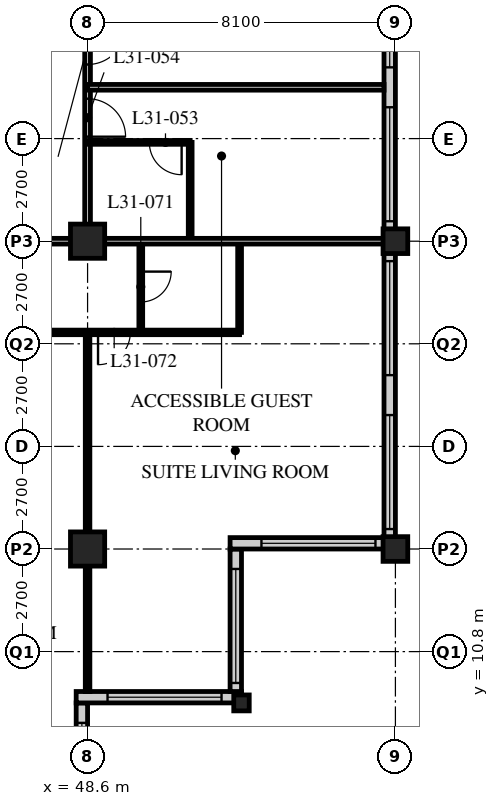
"""IFC4 building model, lengths in metres.
Left out: names, types, materials, properties, quantities, classifications, styles, units other than length and angle.
Written with IfcOpenShell. Run it as: python <this file> out.ifc"""

import sys

from ifc_helpers import new_model, si_unit, direction, frame, frame_2d, origin, origin_2d, place, context, subcontext, project, spatial, rectangle, hollow_rectangle, i_section, extrude, element, fill, save


model = new_model("IFC4")
c1 = context("Model", 3, precision=1e-05, world=origin(), true_north=direction((0.0, 1.0)))
c2 = subcontext(c1, "Body", "Model", "MODEL_VIEW")
j1 = project(units=[si_unit("LENGTHUNIT", "METRE"), si_unit("PLANEANGLEUNIT", "RADIAN")], contexts=[c1])
p1 = place(None, origin())
s1 = spatial("IfcSite", under=j1, at=p1, CompositionType="ELEMENT")
p2 = place(p1, origin())
s2 = spatial("IfcBuilding", under=s1, at=p2, CompositionType="ELEMENT")
p3 = place(p2, frame((0.0, 0.0, 123.8)))
s3 = spatial("IfcBuildingStorey", under=s2, at=p3, CompositionType="ELEMENT", Elevation=123.8)
for number, where, z_axis, x_axis in (
    (1, (48.6, 13.5, 0.0), (0.0, 0.0, 1.0), (1.0, 0.0, 0.0)),
    (2, (48.6, 21.6, 0.0), (0.0, 0.0, 1.0), (1.0, 0.0, 0.0)),
):
    element("IfcColumn", number, at=place(p3, frame(where, z_axis=z_axis, x_axis=x_axis)), inside=s3, PredefinedType="COLUMN", context=c2, shape_type="SweptSolid", body=[
        extrude(hollow_rectangle(XDim=0.9, YDim=0.9, WallThickness=0.09, at=origin_2d()), origin(), (0.0, 0.0, 1.0), 3.4),
    ])
p4 = place(p3, frame((52.65, 9.45, 0.0), z_axis=(0.0, 0.0, 1.0), x_axis=(1.0, 0.0, 0.0)))
e3 = element("IfcColumn", 3, at=p4, inside=s3, PredefinedType="COLUMN", context=c2, shape_type="SweptSolid", body=[
    extrude(i_section(OverallWidth=0.407, OverallDepth=0.419, WebThickness=0.031, FlangeThickness=0.049, FilletRadius=0.015, at=origin_2d()), origin(), (0.0, 0.0, 1.0), 3.4),
])
for number, where, z_axis, x_axis in (
    (4, (56.7, 13.5, 0.0), (0.0, 0.0, 1.0), (1.0, 0.0, 0.0)),
    (5, (56.7, 21.6, 0.0), (0.0, 0.0, 1.0), (1.0, 0.0, 0.0)),
):
    element("IfcColumn", number, at=place(p3, frame(where, z_axis=z_axis, x_axis=x_axis)), inside=s3, PredefinedType="COLUMN", context=c2, shape_type="SweptSolid", body=[
        extrude(hollow_rectangle(XDim=0.65, YDim=0.65, WallThickness=0.055, at=origin_2d()), origin(), (0.0, 0.0, 1.0), 3.4),
    ])
p5 = place(p3, frame((48.45, 5.7, 0.0), z_axis=(0.0, 0.0, 1.0), x_axis=(0.0, 1.0, 0.0)))
e6 = element("IfcWall", 6, at=p5, inside=s3, PredefinedType="SOLIDWALL", context=c2, shape_type="SweptSolid", body=[
    extrude(rectangle(XDim=3.75, YDim=0.3, at=frame_2d((1.875, 0.0))), origin(), (0.0, 0.0, 1.0), 3.19),
])
p6 = place(p5, frame((0.225, 0.0, 0.9)))
e7 = element("IfcOpeningElement", 7, at=p6, cuts=e6, PredefinedType="OPENING", context=c2, shape_type="SweptSolid", body=[
    extrude(rectangle(XDim=3.0, YDim=1.5, at=frame_2d((1.5, 0.75))), frame((0.0, 0.16, 0.0), z_axis=(0.0, -1.0, 0.0), x_axis=(1.0, 0.0, 0.0)), (0.0, 0.0, 1.0), 0.32),
])
p7 = place(p3, frame((48.3, 9.6, 0.0), z_axis=(0.0, 0.0, 1.0), x_axis=(1.0, 0.0, 0.0)))
e8 = element("IfcWall", 8, at=p7, inside=s3, PredefinedType="SOLIDWALL", context=c2, shape_type="SweptSolid", body=[
    extrude(rectangle(XDim=4.35, YDim=0.3, at=frame_2d((2.175, 0.0))), origin(), (0.0, 0.0, 1.0), 3.19),
])
p8 = place(p7, frame((0.825, 0.0, 0.9)))
e9 = element("IfcOpeningElement", 9, at=p8, cuts=e8, PredefinedType="OPENING", context=c2, shape_type="SweptSolid", body=[
    extrude(rectangle(XDim=3.0, YDim=1.5, at=frame_2d((1.5, 0.75))), frame((0.0, 0.16, 0.0), z_axis=(0.0, -1.0, 0.0), x_axis=(1.0, 0.0, 0.0)), (0.0, 0.0, 1.0), 0.32),
])
p9 = place(p3, frame((52.5, 9.75, 0.0), z_axis=(0.0, 0.0, 1.0), x_axis=(0.0, 1.0, 0.0)))
e10 = element("IfcWall", 10, at=p9, inside=s3, PredefinedType="SOLIDWALL", context=c2, shape_type="SweptSolid", body=[
    extrude(rectangle(XDim=3.75, YDim=0.3, at=frame_2d((1.875, 0.0))), origin(), (0.0, 0.0, 1.0), 3.19),
])
p10 = place(p9, frame((0.225, 0.0, 0.9)))
e11 = element("IfcOpeningElement", 11, at=p10, cuts=e10, PredefinedType="OPENING", context=c2, shape_type="SweptSolid", body=[
    extrude(rectangle(XDim=3.0, YDim=1.5, at=frame_2d((1.5, 0.75))), frame((0.0, 0.16, 0.0), z_axis=(0.0, -1.0, 0.0), x_axis=(1.0, 0.0, 0.0)), (0.0, 0.0, 1.0), 0.32),
])
p11 = place(p3, frame((52.35, 13.65, 0.0), z_axis=(0.0, 0.0, 1.0), x_axis=(1.0, 0.0, 0.0)))
e12 = element("IfcWall", 12, at=p11, inside=s3, PredefinedType="SOLIDWALL", context=c2, shape_type="SweptSolid", body=[
    extrude(rectangle(XDim=4.35, YDim=0.3, at=frame_2d((2.175, 0.0))), origin(), (0.0, 0.0, 1.0), 3.19),
])
p12 = place(p11, frame((0.825, 0.0, 0.9)))
e13 = element("IfcOpeningElement", 13, at=p12, cuts=e12, PredefinedType="OPENING", context=c2, shape_type="SweptSolid", body=[
    extrude(rectangle(XDim=3.0, YDim=1.5, at=frame_2d((1.5, 0.75))), frame((0.0, 0.16, 0.0), z_axis=(0.0, -1.0, 0.0), x_axis=(1.0, 0.0, 0.0)), (0.0, 0.0, 1.0), 0.32),
])
p13 = place(p3, frame((56.55, 13.8, 0.0), z_axis=(0.0, 0.0, 1.0), x_axis=(0.0, 1.0, 0.0)))
e14 = element("IfcWall", 14, at=p13, inside=s3, PredefinedType="SOLIDWALL", context=c2, shape_type="SweptSolid", body=[
    extrude(rectangle(XDim=32.1, YDim=0.3, at=frame_2d((16.05, 0.0))), origin(), (0.0, 0.0, 1.0), 3.19),
])
p14 = place(p13, frame((0.225, 0.0, 0.9)))
e15 = element("IfcOpeningElement", 15, at=p14, cuts=e14, PredefinedType="OPENING", context=c2, shape_type="SweptSolid", body=[
    extrude(rectangle(XDim=3.0, YDim=2.0, at=frame_2d((1.5, 1.0))), frame((0.0, 0.16, 0.0), z_axis=(0.0, -1.0, 0.0), x_axis=(1.0, 0.0, 0.0)), (0.0, 0.0, 1.0), 0.32),
])
p15 = place(p13, frame((4.275, 0.0, 0.9)))
e16 = element("IfcOpeningElement", 16, at=p15, cuts=e14, PredefinedType="OPENING", context=c2, shape_type="SweptSolid", body=[
    extrude(rectangle(XDim=3.0, YDim=2.0, at=frame_2d((1.5, 1.0))), frame((0.0, 0.16, 0.0), z_axis=(0.0, -1.0, 0.0), x_axis=(1.0, 0.0, 0.0)), (0.0, 0.0, 1.0), 0.32),
])
p16 = place(p13, frame((8.325, 0.0, 0.9)))
e17 = element("IfcOpeningElement", 17, at=p16, cuts=e14, PredefinedType="OPENING", context=c2, shape_type="SweptSolid", body=[
    extrude(rectangle(XDim=3.0, YDim=2.0, at=frame_2d((1.5, 1.0))), frame((0.0, 0.16, 0.0), z_axis=(0.0, -1.0, 0.0), x_axis=(1.0, 0.0, 0.0)), (0.0, 0.0, 1.0), 0.32),
])
p17 = place(p13, frame((12.375, 0.0, 0.9)))
e18 = element("IfcOpeningElement", 18, at=p17, cuts=e14, PredefinedType="OPENING", context=c2, shape_type="SweptSolid", body=[
    extrude(rectangle(XDim=3.0, YDim=2.0, at=frame_2d((1.5, 1.0))), frame((0.0, 0.16, 0.0), z_axis=(0.0, -1.0, 0.0), x_axis=(1.0, 0.0, 0.0)), (0.0, 0.0, 1.0), 0.32),
])
p18 = place(p13, frame((16.425, 0.0, 0.9)))
e19 = element("IfcOpeningElement", 19, at=p18, cuts=e14, PredefinedType="OPENING", context=c2, shape_type="SweptSolid", body=[
    extrude(rectangle(XDim=3.0, YDim=2.0, at=frame_2d((1.5, 1.0))), frame((0.0, 0.16, 0.0), z_axis=(0.0, -1.0, 0.0), x_axis=(1.0, 0.0, 0.0)), (0.0, 0.0, 1.0), 0.32),
])
p19 = place(p13, frame((20.475, 0.0, 0.9)))
e20 = element("IfcOpeningElement", 20, at=p19, cuts=e14, PredefinedType="OPENING", context=c2, shape_type="SweptSolid", body=[
    extrude(rectangle(XDim=3.0, YDim=2.0, at=frame_2d((1.5, 1.0))), frame((0.0, 0.16, 0.0), z_axis=(0.0, -1.0, 0.0), x_axis=(1.0, 0.0, 0.0)), (0.0, 0.0, 1.0), 0.32),
])
p20 = place(p13, frame((24.525, 0.0, 0.9)))
e21 = element("IfcOpeningElement", 21, at=p20, cuts=e14, PredefinedType="OPENING", context=c2, shape_type="SweptSolid", body=[
    extrude(rectangle(XDim=3.0, YDim=2.0, at=frame_2d((1.5, 1.0))), frame((0.0, 0.16, 0.0), z_axis=(0.0, -1.0, 0.0), x_axis=(1.0, 0.0, 0.0)), (0.0, 0.0, 1.0), 0.32),
])
p21 = place(p13, frame((28.575, 0.0, 0.9)))
e22 = element("IfcOpeningElement", 22, at=p21, cuts=e14, PredefinedType="OPENING", context=c2, shape_type="SweptSolid", body=[
    extrude(rectangle(XDim=3.0, YDim=2.0, at=frame_2d((1.5, 1.0))), frame((0.0, 0.16, 0.0), z_axis=(0.0, -1.0, 0.0), x_axis=(1.0, 0.0, 0.0)), (0.0, 0.0, 1.0), 0.32),
])
p22 = place(p3, frame((8.1, 21.6, 0.0), z_axis=(0.0, 0.0, 1.0), x_axis=(1.0, 0.0, 0.0)))
e23 = element("IfcWall", 23, at=p22, inside=s3, PredefinedType="PARTITIONING", context=c2, shape_type="SweptSolid", body=[
    extrude(rectangle(XDim=40.5, YDim=0.15, at=frame_2d((20.25, 0.0))), origin(), (0.0, 0.0, 1.0), 2.578),
])
p23 = place(p22, frame((9.625, 0.0, 0.0)))
e24 = element("IfcOpeningElement", 24, at=p23, cuts=e23, PredefinedType="OPENING", context=c2, shape_type="SweptSolid", body=[
    extrude(rectangle(XDim=1.0, YDim=2.1, at=frame_2d((0.5, 1.05))), frame((0.0, 0.085, 0.0), z_axis=(0.0, -1.0, 0.0), x_axis=(1.0, 0.0, 0.0)), (0.0, 0.0, 1.0), 0.17),
])
p24 = place(p22, frame((21.775, 0.0, 0.0)))
e25 = element("IfcOpeningElement", 25, at=p24, cuts=e23, PredefinedType="OPENING", context=c2, shape_type="SweptSolid", body=[
    extrude(rectangle(XDim=1.0, YDim=2.1, at=frame_2d((0.5, 1.05))), frame((0.0, 0.085, 0.0), z_axis=(0.0, -1.0, 0.0), x_axis=(1.0, 0.0, 0.0)), (0.0, 0.0, 1.0), 0.17),
])
p25 = place(p22, frame((28.95, 0.0, 0.0)))
e26 = element("IfcOpeningElement", 26, at=p25, cuts=e23, PredefinedType="OPENING", context=c2, shape_type="SweptSolid", body=[
    extrude(rectangle(XDim=1.0, YDim=2.1, at=frame_2d((0.5, 1.05))), frame((0.0, 0.085, 0.0), z_axis=(0.0, -1.0, 0.0), x_axis=(1.0, 0.0, 0.0)), (0.0, 0.0, 1.0), 0.17),
])
p26 = place(p22, frame((34.85, 0.0, 0.0)))
e27 = element("IfcOpeningElement", 27, at=p26, cuts=e23, PredefinedType="OPENING", context=c2, shape_type="SweptSolid", body=[
    extrude(rectangle(XDim=1.0, YDim=2.1, at=frame_2d((0.5, 1.05))), frame((0.0, 0.085, 0.0), z_axis=(0.0, -1.0, 0.0), x_axis=(1.0, 0.0, 0.0)), (0.0, 0.0, 1.0), 0.17),
])
p27 = place(p22, frame((1.525, 0.0, 0.0)))
e28 = element("IfcOpeningElement", 28, at=p27, cuts=e23, PredefinedType="OPENING", context=c2, shape_type="SweptSolid", body=[
    extrude(rectangle(XDim=1.0, YDim=2.1, at=frame_2d((0.5, 1.05))), frame((0.0, 0.085, 0.0), z_axis=(0.0, -1.0, 0.0), x_axis=(1.0, 0.0, 0.0)), (0.0, 0.0, 1.0), 0.17),
])
p28 = place(p22, frame((37.975, 0.0, 0.0)))
e29 = element("IfcOpeningElement", 29, at=p28, cuts=e23, PredefinedType="OPENING", context=c2, shape_type="SweptSolid", body=[
    extrude(rectangle(XDim=1.0, YDim=2.1, at=frame_2d((0.5, 1.05))), frame((0.0, 0.085, 0.0), z_axis=(0.0, -1.0, 0.0), x_axis=(1.0, 0.0, 0.0)), (0.0, 0.0, 1.0), 0.17),
])
p29 = place(p3, frame((48.6, 21.6, 0.0), z_axis=(0.0, 0.0, 1.0), x_axis=(0.0, 1.0, 0.0)))
e30 = element("IfcWall", 30, at=p29, inside=s3, PredefinedType="PARTITIONING", context=c2, shape_type="SweptSolid", body=[
    extrude(rectangle(XDim=24.3, YDim=0.15, at=frame_2d((12.15, 0.0))), origin(), (0.0, 0.0, 1.0), 2.578),
])
p30 = place(p29, frame((2.75, 0.0, 0.0)))
e31 = element("IfcOpeningElement", 31, at=p30, cuts=e30, PredefinedType="OPENING", context=c2, shape_type="SweptSolid", body=[
    extrude(rectangle(XDim=1.0, YDim=2.1, at=frame_2d((0.5, 1.05))), frame((0.0, 0.085, 0.0), z_axis=(0.0, -1.0, 0.0), x_axis=(1.0, 0.0, 0.0)), (0.0, 0.0, 1.0), 0.17),
])
p31 = place(p29, frame((4.65, 0.0, 0.0)))
e32 = element("IfcOpeningElement", 32, at=p31, cuts=e30, PredefinedType="OPENING", context=c2, shape_type="SweptSolid", body=[
    extrude(rectangle(XDim=1.0, YDim=2.1, at=frame_2d((0.5, 1.05))), frame((0.0, 0.085, 0.0), z_axis=(0.0, -1.0, 0.0), x_axis=(1.0, 0.0, 0.0)), (0.0, 0.0, 1.0), 0.17),
])
p32 = place(p29, frame((10.0, 0.0, 0.0)))
e33 = element("IfcOpeningElement", 33, at=p32, cuts=e30, PredefinedType="OPENING", context=c2, shape_type="SweptSolid", body=[
    extrude(rectangle(XDim=1.0, YDim=2.1, at=frame_2d((0.5, 1.05))), frame((0.0, 0.085, 0.0), z_axis=(0.0, -1.0, 0.0), x_axis=(1.0, 0.0, 0.0)), (0.0, 0.0, 1.0), 0.17),
])
p33 = place(p29, frame((18.1, 0.0, 0.0)))
e34 = element("IfcOpeningElement", 34, at=p33, cuts=e30, PredefinedType="OPENING", context=c2, shape_type="SweptSolid", body=[
    extrude(rectangle(XDim=1.0, YDim=2.1, at=frame_2d((0.5, 1.05))), frame((0.0, 0.085, 0.0), z_axis=(0.0, -1.0, 0.0), x_axis=(1.0, 0.0, 0.0)), (0.0, 0.0, 1.0), 0.17),
])
p34 = place(p3, frame((51.3, 21.6, 0.0), z_axis=(0.0, 0.0, 1.0), x_axis=(0.0, 1.0, 0.0)))
e35 = element("IfcWall", 35, at=p34, inside=s3, PredefinedType="PARTITIONING", context=c2, shape_type="SweptSolid", body=[
    extrude(rectangle(XDim=2.6, YDim=0.1, at=frame_2d((1.3, 0.0))), origin(), (0.0, 0.0, 1.0), 3.19),
])
p35 = place(p3, frame((48.6, 24.2, 0.0), z_axis=(0.0, 0.0, 1.0), x_axis=(1.0, 0.0, 0.0)))
e36 = element("IfcWall", 36, at=p35, inside=s3, PredefinedType="PARTITIONING", context=c2, shape_type="SweptSolid", body=[
    extrude(rectangle(XDim=2.7, YDim=0.1, at=frame_2d((1.35, 0.0))), origin(), (0.0, 0.0, 1.0), 3.19),
])
p36 = place(p35, frame((1.625, 0.0, 0.0)))
e37 = element("IfcOpeningElement", 37, at=p36, cuts=e36, PredefinedType="OPENING", context=c2, shape_type="SweptSolid", body=[
    extrude(rectangle(XDim=0.85, YDim=2.1, at=frame_2d((0.425, 1.05))), frame((0.0, 0.06, 0.0), z_axis=(0.0, -1.0, 0.0), x_axis=(1.0, 0.0, 0.0)), (0.0, 0.0, 1.0), 0.12),
])
p37 = place(p3, frame((48.6, 25.65, 0.0), z_axis=(0.0, 0.0, 1.0), x_axis=(1.0, 0.0, 0.0)))
e38 = element("IfcWall", 38, at=p37, inside=s3, PredefinedType="PARTITIONING", context=c2, shape_type="SweptSolid", body=[
    extrude(rectangle(XDim=7.8, YDim=0.15, at=frame_2d((3.9, 0.0))), origin(), (0.0, 0.0, 1.0), 3.19),
])
p38 = place(p3, frame((44.55, 19.2, 0.0), z_axis=(0.0, 0.0, 1.0), x_axis=(1.0, 0.0, 0.0)))
e39 = element("IfcWall", 39, at=p38, inside=s3, PredefinedType="PARTITIONING", context=c2, shape_type="SweptSolid", body=[
    extrude(rectangle(XDim=8.05, YDim=0.12, at=frame_2d((4.025, 0.0))), origin(), (0.0, 0.0, 1.0), 3.19),
])
p39 = place(p38, frame((0.475, 0.0, 0.0)))
e40 = element("IfcOpeningElement", 40, at=p39, cuts=e39, PredefinedType="OPENING", context=c2, shape_type="SweptSolid", body=[
    extrude(rectangle(XDim=0.85, YDim=2.1, at=frame_2d((0.425, 1.05))), frame((0.0, 0.07, 0.0), z_axis=(0.0, -1.0, 0.0), x_axis=(1.0, 0.0, 0.0)), (0.0, 0.0, 1.0), 0.14),
])
p40 = place(p38, frame((4.325, 0.0, 0.0)))
e41 = element("IfcOpeningElement", 41, at=p40, cuts=e39, PredefinedType="OPENING", context=c2, shape_type="SweptSolid", body=[
    extrude(rectangle(XDim=0.85, YDim=2.1, at=frame_2d((0.425, 1.05))), frame((0.0, 0.07, 0.0), z_axis=(0.0, -1.0, 0.0), x_axis=(1.0, 0.0, 0.0)), (0.0, 0.0, 1.0), 0.14),
])
p41 = place(p3, frame((50.0, 21.6, 0.0), z_axis=(0.0, 0.0, 1.0), x_axis=(0.0, -1.0, 0.0)))
e42 = element("IfcWall", 42, at=p41, inside=s3, PredefinedType="PARTITIONING", context=c2, shape_type="SweptSolid", body=[
    extrude(rectangle(XDim=2.4, YDim=0.1, at=frame_2d((1.2, 0.0))), origin(), (0.0, 0.0, 1.0), 3.19),
])
p42 = place(p41, frame((0.8, 0.0, 0.0)))
e43 = element("IfcOpeningElement", 43, at=p42, cuts=e42, PredefinedType="OPENING", context=c2, shape_type="SweptSolid", body=[
    extrude(rectangle(XDim=0.8, YDim=2.1, at=frame_2d((0.4, 1.05))), frame((0.0, 0.06, 0.0), z_axis=(0.0, -1.0, 0.0), x_axis=(1.0, 0.0, 0.0)), (0.0, 0.0, 1.0), 0.12),
])
p43 = place(p3, frame((52.6, 21.6, 0.0), z_axis=(0.0, 0.0, 1.0), x_axis=(0.0, -1.0, 0.0)))
e44 = element("IfcWall", 44, at=p43, inside=s3, PredefinedType="PARTITIONING", context=c2, shape_type="SweptSolid", body=[
    extrude(rectangle(XDim=2.4, YDim=0.1, at=frame_2d((1.2, 0.0))), origin(), (0.0, 0.0, 1.0), 3.19),
])
p44 = place(p3, frame((48.6, 19.2, 0.0), z_axis=(0.0, 0.0, 1.0), x_axis=(0.0, -1.0, 0.0)))
e45 = element("IfcWall", 45, at=p44, inside=s3, PredefinedType="PARTITIONING", context=c2, shape_type="SweptSolid", body=[
    extrude(rectangle(XDim=9.45, YDim=0.12, at=frame_2d((4.725, 0.0))), origin(), (0.0, 0.0, 1.0), 2.578),
])
p45 = place(p3, frame((48.6, 21.6, 0.0), z_axis=(0.0, 0.0, 1.0), x_axis=(1.0, 0.0, 0.0)))
e46 = element("IfcWall", 46, at=p45, inside=s3, PredefinedType="PARTITIONING", context=c2, shape_type="SweptSolid", body=[
    extrude(rectangle(XDim=7.8, YDim=0.15, at=frame_2d((3.9, 0.0))), origin(), (0.0, 0.0, 1.0), 2.578),
])
p46 = place(p6, origin())
e47 = element("IfcWindow", 47, at=p46, inside=s3, PartitioningType="SINGLE_PANEL", PredefinedType="WINDOW", context=c2, shape_type="SweptSolid", body=[
    extrude(rectangle(XDim=3.0, YDim=1.5, at=frame_2d((1.5, 0.75))), frame((0.0, 0.03, 0.0), z_axis=(0.0, -1.0, 0.0), x_axis=(1.0, 0.0, 0.0)), (0.0, 0.0, 1.0), 0.06),
])
fill(e7, e47)
p47 = place(p8, origin())
e48 = element("IfcWindow", 48, at=p47, inside=s3, PartitioningType="SINGLE_PANEL", PredefinedType="WINDOW", context=c2, shape_type="SweptSolid", body=[
    extrude(rectangle(XDim=3.0, YDim=1.5, at=frame_2d((1.5, 0.75))), frame((0.0, 0.03, 0.0), z_axis=(0.0, -1.0, 0.0), x_axis=(1.0, 0.0, 0.0)), (0.0, 0.0, 1.0), 0.06),
])
fill(e9, e48)
p48 = place(p10, origin())
e49 = element("IfcWindow", 49, at=p48, inside=s3, PartitioningType="SINGLE_PANEL", PredefinedType="WINDOW", context=c2, shape_type="SweptSolid", body=[
    extrude(rectangle(XDim=3.0, YDim=1.5, at=frame_2d((1.5, 0.75))), frame((0.0, 0.03, 0.0), z_axis=(0.0, -1.0, 0.0), x_axis=(1.0, 0.0, 0.0)), (0.0, 0.0, 1.0), 0.06),
])
fill(e11, e49)
p49 = place(p12, origin())
e50 = element("IfcWindow", 50, at=p49, inside=s3, PartitioningType="SINGLE_PANEL", PredefinedType="WINDOW", context=c2, shape_type="SweptSolid", body=[
    extrude(rectangle(XDim=3.0, YDim=1.5, at=frame_2d((1.5, 0.75))), frame((0.0, 0.03, 0.0), z_axis=(0.0, -1.0, 0.0), x_axis=(1.0, 0.0, 0.0)), (0.0, 0.0, 1.0), 0.06),
])
fill(e13, e50)
p50 = place(p14, origin())
e51 = element("IfcWindow", 51, at=p50, inside=s3, PartitioningType="SINGLE_PANEL", PredefinedType="WINDOW", context=c2, shape_type="SweptSolid", body=[
    extrude(rectangle(XDim=3.0, YDim=2.0, at=frame_2d((1.5, 1.0))), frame((0.0, 0.03, 0.0), z_axis=(0.0, -1.0, 0.0), x_axis=(1.0, 0.0, 0.0)), (0.0, 0.0, 1.0), 0.06),
])
fill(e15, e51)
p51 = place(p15, origin())
e52 = element("IfcWindow", 52, at=p51, inside=s3, PartitioningType="SINGLE_PANEL", PredefinedType="WINDOW", context=c2, shape_type="SweptSolid", body=[
    extrude(rectangle(XDim=3.0, YDim=2.0, at=frame_2d((1.5, 1.0))), frame((0.0, 0.03, 0.0), z_axis=(0.0, -1.0, 0.0), x_axis=(1.0, 0.0, 0.0)), (0.0, 0.0, 1.0), 0.06),
])
fill(e16, e52)
p52 = place(p16, origin())
e53 = element("IfcWindow", 53, at=p52, inside=s3, PartitioningType="SINGLE_PANEL", PredefinedType="WINDOW", context=c2, shape_type="SweptSolid", body=[
    extrude(rectangle(XDim=3.0, YDim=2.0, at=frame_2d((1.5, 1.0))), frame((0.0, 0.03, 0.0), z_axis=(0.0, -1.0, 0.0), x_axis=(1.0, 0.0, 0.0)), (0.0, 0.0, 1.0), 0.06),
])
fill(e17, e53)
p53 = place(p17, origin())
e54 = element("IfcWindow", 54, at=p53, inside=s3, PartitioningType="SINGLE_PANEL", PredefinedType="WINDOW", context=c2, shape_type="SweptSolid", body=[
    extrude(rectangle(XDim=3.0, YDim=2.0, at=frame_2d((1.5, 1.0))), frame((0.0, 0.03, 0.0), z_axis=(0.0, -1.0, 0.0), x_axis=(1.0, 0.0, 0.0)), (0.0, 0.0, 1.0), 0.06),
])
fill(e18, e54)
p54 = place(p36, origin())
e55 = element("IfcDoor", 55, at=p54, inside=s3, OperationType="SINGLE_SWING_LEFT", PredefinedType="DOOR", context=c2, shape_type="SweptSolid", body=[
    extrude(rectangle(XDim=0.85, YDim=2.1, at=frame_2d((0.425, 1.05))), frame((0.0, 0.025, 0.0), z_axis=(0.0, -1.0, 0.0), x_axis=(1.0, 0.0, 0.0)), (0.0, 0.0, 1.0), 0.05),
])
fill(e37, e55)
p55 = place(p30, origin())
e56 = element("IfcDoor", 56, at=p55, inside=s3, OperationType="SINGLE_SWING_RIGHT", PredefinedType="DOOR", context=c2, shape_type="SweptSolid", body=[
    extrude(rectangle(XDim=1.0, YDim=2.1, at=frame_2d((0.5, 1.05))), frame((0.0, 0.025, 0.0), z_axis=(0.0, -1.0, 0.0), x_axis=(1.0, 0.0, 0.0)), (0.0, 0.0, 1.0), 0.05),
])
fill(e31, e56)
p56 = place(p31, origin())
e57 = element("IfcDoor", 57, at=p56, inside=s3, OperationType="SINGLE_SWING_LEFT", PredefinedType="DOOR", context=c2, shape_type="SweptSolid", body=[
    extrude(rectangle(XDim=1.0, YDim=2.1, at=frame_2d((0.5, 1.05))), frame((0.0, 0.025, 0.0), z_axis=(0.0, -1.0, 0.0), x_axis=(1.0, 0.0, 0.0)), (0.0, 0.0, 1.0), 0.05),
])
fill(e32, e57)
p57 = place(p42, origin())
e58 = element("IfcDoor", 58, at=p57, inside=s3, OperationType="SINGLE_SWING_LEFT", PredefinedType="DOOR", context=c2, shape_type="SweptSolid", body=[
    extrude(rectangle(XDim=0.8, YDim=2.1, at=frame_2d((0.4, 1.05))), frame((0.0, 0.025, 0.0), z_axis=(0.0, -1.0, 0.0), x_axis=(1.0, 0.0, 0.0)), (0.0, 0.0, 1.0), 0.05),
])
fill(e43, e58)
p58 = place(p40, origin())
e59 = element("IfcDoor", 59, at=p58, inside=s3, OperationType="SINGLE_SWING_RIGHT", PredefinedType="DOOR", context=c2, shape_type="SweptSolid", body=[
    extrude(rectangle(XDim=0.85, YDim=2.1, at=frame_2d((0.425, 1.05))), frame((0.0, 0.025, 0.0), z_axis=(0.0, -1.0, 0.0), x_axis=(1.0, 0.0, 0.0)), (0.0, 0.0, 1.0), 0.05),
])
fill(e41, e59)
save(model, sys.argv[1])
